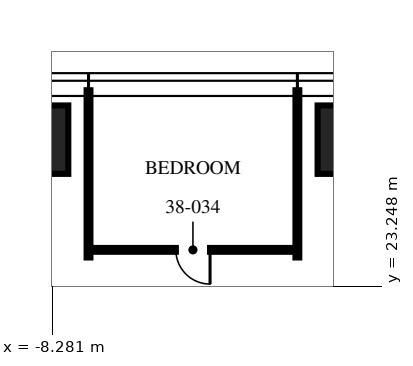
"""IFC4 building model, lengths in metres.
Left out: names, types, materials, properties, quantities, classifications, styles, units other than length and angle.
Written with IfcOpenShell. Run it as: python <this file> out.ifc"""

import sys

from ifc_helpers import new_model, si_unit, direction, frame, frame_2d, origin, origin_2d, place, context, subcontext, project, spatial, rectangle, extrude, element, fill, save


model = new_model("IFC4")
c1 = context("Model", 3, precision=1e-05, world=origin(), true_north=direction((0.0, 1.0)))
c2 = subcontext(c1, "Body", "Model", "MODEL_VIEW")
j1 = project(units=[si_unit("LENGTHUNIT", "METRE"), si_unit("PLANEANGLEUNIT", "RADIAN")], contexts=[c1])
p1 = place(None, origin())
s1 = spatial("IfcSite", under=j1, at=p1, CompositionType="ELEMENT")
p2 = place(p1, origin())
s2 = spatial("IfcBuilding", under=s1, at=p2, CompositionType="ELEMENT")
p3 = place(p2, frame((0.0, 0.0, 152.25)))
s3 = spatial("IfcBuildingStorey", under=s2, at=p3, CompositionType="ELEMENT", Elevation=152.25)
for number, where, z_axis, x_axis in (
    (1, (-9.16, 27.1, 0.0), (0.0, 0.0, 1.0), (1.0, 0.0, 0.0)),
    (2, (0.0, 27.1, 0.0), (0.0, 0.0, 1.0), (1.0, 0.0, 0.0)),
):
    element("IfcColumn", number, at=place(p3, frame(where, z_axis=z_axis, x_axis=x_axis)), inside=s3, PredefinedType="COLUMN", context=c2, shape_type="SweptSolid", body=[
        extrude(rectangle(XDim=2.6, YDim=1.8, at=origin_2d()), origin(), (0.0, 0.0, 1.0), 3.75),
    ])
for number, where, z_axis, x_axis in (
    (3, (-1.832, 24.0, 0.0), (0.0, 0.0, 1.0), (0.0, 1.0, 0.0)),
    (4, (-7.328, 24.0, 0.0), (0.0, 0.0, 1.0), (0.0, 1.0, 0.0)),
):
    element("IfcWall", number, at=place(p3, frame(where, z_axis=z_axis, x_axis=x_axis)), inside=s3, PredefinedType="PARTITIONING", context=c2, shape_type="SweptSolid", body=[
        extrude(rectangle(XDim=4.4, YDim=0.1, at=frame_2d((2.2, 0.0))), origin(), (0.0, 0.0, 1.0), 2.81),
    ])
p4 = place(p3, frame((-1.832, 24.2, 0.0), z_axis=(0.0, 0.0, 1.0), x_axis=(-1.0, 0.0, 0.0)))
e5 = element("IfcWall", 5, at=p4, inside=s3, PredefinedType="PARTITIONING", context=c2, shape_type="SweptSolid", body=[
    extrude(rectangle(XDim=5.496, YDim=0.1, at=frame_2d((2.748, 0.0))), origin(), (0.0, 0.0, 1.0), 2.81),
])
p5 = place(p4, frame((2.298, 0.0, 0.0)))
e6 = element("IfcOpeningElement", 6, at=p5, cuts=e5, PredefinedType="OPENING", context=c2, shape_type="SweptSolid", body=[
    extrude(rectangle(XDim=0.9, YDim=2.1, at=frame_2d((0.45, 1.05))), frame((0.0, 0.06, 0.0), z_axis=(0.0, -1.0, 0.0), x_axis=(1.0, 0.0, 0.0)), (0.0, 0.0, 1.0), 0.12),
])
p6 = place(p5, origin())
e7 = element("IfcDoor", 7, at=p6, inside=s3, OperationType="SINGLE_SWING_LEFT", PredefinedType="DOOR", context=c2, shape_type="SweptSolid", body=[
    extrude(rectangle(XDim=0.9, YDim=2.1, at=frame_2d((0.45, 1.05))), frame((0.0, 0.025, 0.0), z_axis=(0.0, -1.0, 0.0), x_axis=(1.0, 0.0, 0.0)), (0.0, 0.0, 1.0), 0.05),
])
fill(e6, e7)
save(model, sys.argv[1])
